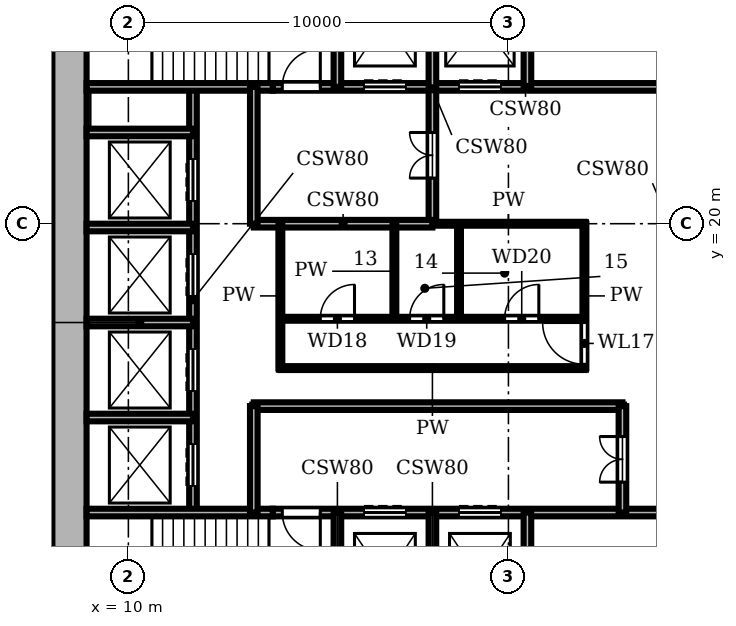
"""IFC4 building model, lengths in metres.
Left out: names, types, materials, properties, quantities, classifications, styles, units other than length and angle.
Written with IfcOpenShell. Run it as: python <this file> out.ifc"""

import sys

from ifc_helpers import new_model, si_unit, direction, frame, frame_2d, origin, place, context, subcontext, project, spatial, rectangle, extrude, element, fill, save


model = new_model("IFC4")
c1 = context("Model", 3, precision=1e-05, world=origin(), true_north=direction((0.0, 1.0)))
c2 = subcontext(c1, "Body", "Model", "MODEL_VIEW")
j1 = project(units=[si_unit("LENGTHUNIT", "METRE"), si_unit("PLANEANGLEUNIT", "RADIAN")], contexts=[c1])
p1 = place(None, origin())
s1 = spatial("IfcSite", under=j1, at=p1, CompositionType="ELEMENT")
p2 = place(p1, origin())
s2 = spatial("IfcBuilding", under=s1, at=p2, CompositionType="ELEMENT")
p3 = place(p2, frame((0.0, 0.0, 105.6)))
s3 = spatial("IfcBuildingStorey", under=s2, at=p3, CompositionType="ELEMENT", Elevation=105.6)
p4 = place(p3, frame((8.45, 27.1, 0.0), z_axis=(0.0, 0.0, 1.0), x_axis=(0.0, -1.0, 0.0)))
e1 = element("IfcWall", 1, at=p4, inside=s3, PredefinedType="SHEAR", context=c2, shape_type="SweptSolid", body=[
    extrude(rectangle(XDim=18.2, YDim=0.9, at=frame_2d((9.1, 0.0))), origin(), (0.0, 0.0, 1.0), 3.9),
])
p5 = place(p3, frame((8.9, 12.4, 0.0), z_axis=(0.0, 0.0, 1.0), x_axis=(1.0, 0.0, 0.0)))
e2 = element("IfcWall", 2, at=p5, inside=s3, PredefinedType="SHEAR", context=c2, shape_type="SweptSolid", body=[
    extrude(rectangle(XDim=4.9, YDim=0.2, at=frame_2d((2.45, 0.0))), origin(), (0.0, 0.0, 1.0), 3.58),
])
p6 = place(p3, frame((13.8, 12.4, 0.0), z_axis=(0.0, 0.0, 1.0), x_axis=(1.0, 0.0, 0.0)))
e3 = element("IfcWall", 3, at=p6, inside=s3, PredefinedType="SHEAR", context=c2, shape_type="SweptSolid", body=[
    extrude(rectangle(XDim=13.3, YDim=0.2, at=frame_2d((6.65, 0.0))), origin(), (0.0, 0.0, 1.0), 3.58),
])
p7 = place(p6, frame((2.4, 0.0, 0.0)))
e4 = element("IfcOpeningElement", 4, at=p7, cuts=e3, PredefinedType="OPENING", context=c2, shape_type="SweptSolid", body=[
    extrude(rectangle(XDim=1.1, YDim=2.1, at=frame_2d((0.55, 1.05))), frame((0.0, 0.11, 0.0), z_axis=(0.0, -1.0, 0.0), x_axis=(1.0, 0.0, 0.0)), (0.0, 0.0, 1.0), 0.22),
])
p8 = place(p6, frame((4.9, 0.0, 0.0)))
e5 = element("IfcOpeningElement", 5, at=p8, cuts=e3, PredefinedType="OPENING", context=c2, shape_type="SweptSolid", body=[
    extrude(rectangle(XDim=1.1, YDim=2.1, at=frame_2d((0.55, 1.05))), frame((0.0, 0.11, 0.0), z_axis=(0.0, -1.0, 0.0), x_axis=(1.0, 0.0, 0.0)), (0.0, 0.0, 1.0), 0.22),
])
p9 = place(p6, frame((0.25, 0.0, 0.0)))
e6 = element("IfcOpeningElement", 6, at=p9, cuts=e3, PredefinedType="OPENING", context=c2, shape_type="SweptSolid", body=[
    extrude(rectangle(XDim=1.0, YDim=2.1, at=frame_2d((0.5, 1.05))), frame((0.0, 0.11, 0.0), z_axis=(0.0, -1.0, 0.0), x_axis=(1.0, 0.0, 0.0)), (0.0, 0.0, 1.0), 0.22),
])
p10 = place(p3, frame((8.9, 14.9, 0.0), z_axis=(0.0, 0.0, 1.0), x_axis=(1.0, 0.0, 0.0)))
e7 = element("IfcWall", 7, at=p10, inside=s3, PredefinedType="SHEAR", context=c2, shape_type="SweptSolid", body=[
    extrude(rectangle(XDim=2.8, YDim=0.2, at=frame_2d((1.4, 0.0))), origin(), (0.0, 0.0, 1.0), 3.58),
])
p11 = place(p3, frame((13.3, 15.2, 0.0), z_axis=(0.0, 0.0, 1.0), x_axis=(1.0, 0.0, 0.0)))
e8 = element("IfcWall", 8, at=p11, inside=s3, PredefinedType="SHEAR", context=c2, shape_type="SweptSolid", body=[
    extrude(rectangle(XDim=9.7, YDim=0.2, at=frame_2d((4.85, 0.0))), origin(), (0.0, 0.0, 1.0), 3.58),
])
p12 = place(p3, frame((14.0, 16.2, 0.0), z_axis=(0.0, 0.0, 1.0), x_axis=(1.0, 0.0, 0.0)))
e9 = element("IfcWall", 9, at=p12, inside=s3, PredefinedType="PARTITIONING", context=c2, shape_type="SweptSolid", body=[
    extrude(rectangle(XDim=8.0, YDim=0.1, at=frame_2d((4.0, 0.0))), origin(), (0.0, 0.0, 1.0), 3.58),
])
p13 = place(p3, frame((8.9, 17.4, 0.0), z_axis=(0.0, 0.0, 1.0), x_axis=(1.0, 0.0, 0.0)))
e10 = element("IfcWall", 10, at=p13, inside=s3, PredefinedType="SHEAR", context=c2, shape_type="SweptSolid", body=[
    extrude(rectangle(XDim=2.8, YDim=0.2, at=frame_2d((1.4, 0.0))), origin(), (0.0, 0.0, 1.0), 3.58),
])
p14 = place(p3, frame((14.0, 17.5, 0.0), z_axis=(0.0, 0.0, 1.0), x_axis=(1.0, 0.0, 0.0)))
e11 = element("IfcWall", 11, at=p14, inside=s3, PredefinedType="PARTITIONING", context=c2, shape_type="SweptSolid", body=[
    extrude(rectangle(XDim=8.0, YDim=0.1, at=frame_2d((4.0, 0.0))), origin(), (0.0, 0.0, 1.0), 3.58),
])
p15 = place(p14, frame((1.05, 0.0, 0.0)))
e12 = element("IfcOpeningElement", 12, at=p15, cuts=e11, PredefinedType="OPENING", context=c2, shape_type="SweptSolid", body=[
    extrude(rectangle(XDim=0.9, YDim=2.1, at=frame_2d((0.45, 1.05))), frame((0.0, 0.06, 0.0), z_axis=(0.0, -1.0, 0.0), x_axis=(1.0, 0.0, 0.0)), (0.0, 0.0, 1.0), 0.12),
])
p16 = place(p14, frame((3.4, 0.0, 0.0)))
e13 = element("IfcOpeningElement", 13, at=p16, cuts=e11, PredefinedType="OPENING", context=c2, shape_type="SweptSolid", body=[
    extrude(rectangle(XDim=0.9, YDim=2.1, at=frame_2d((0.45, 1.05))), frame((0.0, 0.06, 0.0), z_axis=(0.0, -1.0, 0.0), x_axis=(1.0, 0.0, 0.0)), (0.0, 0.0, 1.0), 0.12),
])
p17 = place(p14, frame((5.9, 0.0, 0.0)))
e14 = element("IfcOpeningElement", 14, at=p17, cuts=e11, PredefinedType="OPENING", context=c2, shape_type="SweptSolid", body=[
    extrude(rectangle(XDim=0.9, YDim=2.1, at=frame_2d((0.45, 1.05))), frame((0.0, 0.06, 0.0), z_axis=(0.0, -1.0, 0.0), x_axis=(1.0, 0.0, 0.0)), (0.0, 0.0, 1.0), 0.12),
])
p18 = place(p3, frame((8.9, 19.9, 0.0), z_axis=(0.0, 0.0, 1.0), x_axis=(1.0, 0.0, 0.0)))
e15 = element("IfcWall", 15, at=p18, inside=s3, PredefinedType="SHEAR", context=c2, shape_type="SweptSolid", body=[
    extrude(rectangle(XDim=2.8, YDim=0.2, at=frame_2d((1.4, 0.0))), origin(), (0.0, 0.0, 1.0), 3.58),
])
p19 = place(p3, frame((18.0, 20.0, 0.0), z_axis=(0.0, 0.0, 1.0), x_axis=(1.0, 0.0, 0.0)))
e16 = element("IfcWall", 16, at=p19, inside=s3, PredefinedType="PARTITIONING", context=c2, shape_type="SweptSolid", body=[
    extrude(rectangle(XDim=4.0, YDim=0.1, at=frame_2d((2.0, 0.0))), origin(), (0.0, 0.0, 1.0), 3.58),
])
p20 = place(p3, frame((13.3, 20.0, 0.0), z_axis=(0.0, 0.0, 1.0), x_axis=(1.0, 0.0, 0.0)))
e17 = element("IfcWall", 17, at=p20, inside=s3, PredefinedType="SHEAR", context=c2, shape_type="SweptSolid", body=[
    extrude(rectangle(XDim=4.7, YDim=0.2, at=frame_2d((2.35, 0.0))), origin(), (0.0, 0.0, 1.0), 3.58),
])
p21 = place(p3, frame((8.9, 22.4, 0.0), z_axis=(0.0, 0.0, 1.0), x_axis=(1.0, 0.0, 0.0)))
e18 = element("IfcWall", 18, at=p21, inside=s3, PredefinedType="SHEAR", context=c2, shape_type="SweptSolid", body=[
    extrude(rectangle(XDim=2.8, YDim=0.2, at=frame_2d((1.4, 0.0))), origin(), (0.0, 0.0, 1.0), 3.58),
])
p22 = place(p3, frame((8.9, 23.6, 0.0), z_axis=(0.0, 0.0, 1.0), x_axis=(1.0, 0.0, 0.0)))
e19 = element("IfcWall", 19, at=p22, inside=s3, PredefinedType="SHEAR", context=c2, shape_type="SweptSolid", body=[
    extrude(rectangle(XDim=4.9, YDim=0.2, at=frame_2d((2.45, 0.0))), origin(), (0.0, 0.0, 1.0), 3.58),
])
p23 = place(p3, frame((13.8, 23.6, 0.0), z_axis=(0.0, 0.0, 1.0), x_axis=(1.0, 0.0, 0.0)))
e20 = element("IfcWall", 20, at=p23, inside=s3, PredefinedType="SHEAR", context=c2, shape_type="SweptSolid", body=[
    extrude(rectangle(XDim=13.3, YDim=0.2, at=frame_2d((6.65, 0.0))), origin(), (0.0, 0.0, 1.0), 3.58),
])
p24 = place(p23, frame((2.4, 0.0, 0.0)))
e21 = element("IfcOpeningElement", 21, at=p24, cuts=e20, PredefinedType="OPENING", context=c2, shape_type="SweptSolid", body=[
    extrude(rectangle(XDim=1.1, YDim=2.1, at=frame_2d((0.55, 1.05))), frame((0.0, 0.11, 0.0), z_axis=(0.0, -1.0, 0.0), x_axis=(1.0, 0.0, 0.0)), (0.0, 0.0, 1.0), 0.22),
])
p25 = place(p23, frame((4.9, 0.0, 0.0)))
e22 = element("IfcOpeningElement", 22, at=p25, cuts=e20, PredefinedType="OPENING", context=c2, shape_type="SweptSolid", body=[
    extrude(rectangle(XDim=1.1, YDim=2.1, at=frame_2d((0.55, 1.05))), frame((0.0, 0.11, 0.0), z_axis=(0.0, -1.0, 0.0), x_axis=(1.0, 0.0, 0.0)), (0.0, 0.0, 1.0), 0.22),
])
p26 = place(p23, frame((0.25, 0.0, 0.0)))
e23 = element("IfcOpeningElement", 23, at=p26, cuts=e20, PredefinedType="OPENING", context=c2, shape_type="SweptSolid", body=[
    extrude(rectangle(XDim=1.0, YDim=2.1, at=frame_2d((0.5, 1.05))), frame((0.0, 0.11, 0.0), z_axis=(0.0, -1.0, 0.0), x_axis=(1.0, 0.0, 0.0)), (0.0, 0.0, 1.0), 0.22),
])
p27 = place(p3, frame((11.7, 12.4, 0.0), z_axis=(0.0, 0.0, 1.0), x_axis=(0.0, 1.0, 0.0)))
e24 = element("IfcWall", 24, at=p27, inside=s3, PredefinedType="SHEAR", context=c2, shape_type="SweptSolid", body=[
    extrude(rectangle(XDim=11.2, YDim=0.2, at=frame_2d((5.6, 0.0))), origin(), (0.0, 0.0, 1.0), 3.58),
])
p28 = place(p27, frame((0.7, 0.0, 0.0)))
e25 = element("IfcOpeningElement", 25, at=p28, cuts=e24, PredefinedType="OPENING", context=c2, shape_type="SweptSolid", body=[
    extrude(rectangle(XDim=1.1, YDim=2.1, at=frame_2d((0.55, 1.05))), frame((0.0, 0.11, 0.0), z_axis=(0.0, -1.0, 0.0), x_axis=(1.0, 0.0, 0.0)), (0.0, 0.0, 1.0), 0.22),
])
p29 = place(p27, frame((3.2, 0.0, 0.0)))
e26 = element("IfcOpeningElement", 26, at=p29, cuts=e24, PredefinedType="OPENING", context=c2, shape_type="SweptSolid", body=[
    extrude(rectangle(XDim=1.1, YDim=2.1, at=frame_2d((0.55, 1.05))), frame((0.0, 0.11, 0.0), z_axis=(0.0, -1.0, 0.0), x_axis=(1.0, 0.0, 0.0)), (0.0, 0.0, 1.0), 0.22),
])
p30 = place(p27, frame((5.7, 0.0, 0.0)))
e27 = element("IfcOpeningElement", 27, at=p30, cuts=e24, PredefinedType="OPENING", context=c2, shape_type="SweptSolid", body=[
    extrude(rectangle(XDim=1.1, YDim=2.1, at=frame_2d((0.55, 1.05))), frame((0.0, 0.11, 0.0), z_axis=(0.0, -1.0, 0.0), x_axis=(1.0, 0.0, 0.0)), (0.0, 0.0, 1.0), 0.22),
])
p31 = place(p27, frame((8.2, 0.0, 0.0)))
e28 = element("IfcOpeningElement", 28, at=p31, cuts=e24, PredefinedType="OPENING", context=c2, shape_type="SweptSolid", body=[
    extrude(rectangle(XDim=1.1, YDim=2.1, at=frame_2d((0.55, 1.05))), frame((0.0, 0.11, 0.0), z_axis=(0.0, -1.0, 0.0), x_axis=(1.0, 0.0, 0.0)), (0.0, 0.0, 1.0), 0.22),
])
p32 = place(p3, frame((13.3, 12.4, 0.0), z_axis=(0.0, 0.0, 1.0), x_axis=(0.0, 1.0, 0.0)))
e29 = element("IfcWall", 29, at=p32, inside=s3, PredefinedType="SHEAR", context=c2, shape_type="SweptSolid", body=[
    extrude(rectangle(XDim=2.8, YDim=0.2, at=frame_2d((1.4, 0.0))), origin(), (0.0, 0.0, 1.0), 3.58),
])
p33 = place(p3, frame((13.3, 20.0, 0.0), z_axis=(0.0, 0.0, 1.0), x_axis=(0.0, 1.0, 0.0)))
e30 = element("IfcWall", 30, at=p33, inside=s3, PredefinedType="SHEAR", context=c2, shape_type="SweptSolid", body=[
    extrude(rectangle(XDim=3.6, YDim=0.2, at=frame_2d((1.8, 0.0))), origin(), (0.0, 0.0, 1.0), 3.58),
])
p34 = place(p3, frame((14.0, 16.2, 0.0), z_axis=(0.0, 0.0, 1.0), x_axis=(0.0, 1.0, 0.0)))
e31 = element("IfcWall", 31, at=p34, inside=s3, PredefinedType="PARTITIONING", context=c2, shape_type="SweptSolid", body=[
    extrude(rectangle(XDim=3.8, YDim=0.1, at=frame_2d((1.9, 0.0))), origin(), (0.0, 0.0, 1.0), 3.58),
])
for number, where, z_axis, x_axis in (
    (32, (15.5, 8.9, 0.0), (0.0, 0.0, 1.0), (0.0, 1.0, 0.0)),
    (33, (15.5, 23.6, 0.0), (0.0, 0.0, 1.0), (0.0, 1.0, 0.0)),
):
    element("IfcWall", number, at=place(p3, frame(where, z_axis=z_axis, x_axis=x_axis)), inside=s3, PredefinedType="SHEAR", context=c2, shape_type="SweptSolid", body=[
        extrude(rectangle(XDim=3.5, YDim=0.2, at=frame_2d((1.75, 0.0))), origin(), (0.0, 0.0, 1.0), 3.58),
    ])
p35 = place(p3, frame((17.0, 17.5, 0.0), z_axis=(0.0, 0.0, 1.0), x_axis=(0.0, 1.0, 0.0)))
e34 = element("IfcWall", 34, at=p35, inside=s3, PredefinedType="PARTITIONING", context=c2, shape_type="SweptSolid", body=[
    extrude(rectangle(XDim=2.5, YDim=0.1, at=frame_2d((1.25, 0.0))), origin(), (0.0, 0.0, 1.0), 3.58),
])
p36 = place(p3, frame((18.0, 8.9, 0.0), z_axis=(0.0, 0.0, 1.0), x_axis=(0.0, 1.0, 0.0)))
e35 = element("IfcWall", 35, at=p36, inside=s3, PredefinedType="SHEAR", context=c2, shape_type="SweptSolid", body=[
    extrude(rectangle(XDim=3.5, YDim=0.2, at=frame_2d((1.75, 0.0))), origin(), (0.0, 0.0, 1.0), 3.58),
])
p37 = place(p3, frame((18.0, 20.0, 0.0), z_axis=(0.0, 0.0, 1.0), x_axis=(0.0, 1.0, 0.0)))
e36 = element("IfcWall", 36, at=p37, inside=s3, PredefinedType="SHEAR", context=c2, shape_type="SweptSolid", body=[
    extrude(rectangle(XDim=7.1, YDim=0.2, at=frame_2d((3.55, 0.0))), origin(), (0.0, 0.0, 1.0), 3.58),
])
p38 = place(p37, frame((1.2, 0.0, 0.0)))
e37 = element("IfcOpeningElement", 37, at=p38, cuts=e36, PredefinedType="OPENING", context=c2, shape_type="SweptSolid", body=[
    extrude(rectangle(XDim=1.2, YDim=2.1, at=frame_2d((0.6, 1.05))), frame((0.0, 0.11, 0.0), z_axis=(0.0, -1.0, 0.0), x_axis=(1.0, 0.0, 0.0)), (0.0, 0.0, 1.0), 0.22),
])
p39 = place(p3, frame((18.7, 17.5, 0.0), z_axis=(0.0, 0.0, 1.0), x_axis=(0.0, 1.0, 0.0)))
e38 = element("IfcWall", 38, at=p39, inside=s3, PredefinedType="PARTITIONING", context=c2, shape_type="SweptSolid", body=[
    extrude(rectangle(XDim=2.5, YDim=0.1, at=frame_2d((1.25, 0.0))), origin(), (0.0, 0.0, 1.0), 3.58),
])
for number, where, z_axis, x_axis in (
    (39, (20.5, 8.9, 0.0), (0.0, 0.0, 1.0), (0.0, 1.0, 0.0)),
    (40, (20.5, 23.6, 0.0), (0.0, 0.0, 1.0), (0.0, 1.0, 0.0)),
):
    element("IfcWall", number, at=place(p3, frame(where, z_axis=z_axis, x_axis=x_axis)), inside=s3, PredefinedType="SHEAR", context=c2, shape_type="SweptSolid", body=[
        extrude(rectangle(XDim=3.5, YDim=0.2, at=frame_2d((1.75, 0.0))), origin(), (0.0, 0.0, 1.0), 3.58),
    ])
p40 = place(p3, frame((22.0, 16.2, 0.0), z_axis=(0.0, 0.0, 1.0), x_axis=(0.0, 1.0, 0.0)))
e41 = element("IfcWall", 41, at=p40, inside=s3, PredefinedType="PARTITIONING", context=c2, shape_type="SweptSolid", body=[
    extrude(rectangle(XDim=3.8, YDim=0.1, at=frame_2d((1.9, 0.0))), origin(), (0.0, 0.0, 1.0), 3.58),
])
p41 = place(p40, frame((0.1, 0.0, 0.0)))
e42 = element("IfcOpeningElement", 42, at=p41, cuts=e41, PredefinedType="OPENING", context=c2, shape_type="SweptSolid", body=[
    extrude(rectangle(XDim=1.1, YDim=2.1, at=frame_2d((0.55, 1.05))), frame((0.0, 0.06, 0.0), z_axis=(0.0, -1.0, 0.0), x_axis=(1.0, 0.0, 0.0)), (0.0, 0.0, 1.0), 0.12),
])
p42 = place(p3, frame((23.0, 12.4, 0.0), z_axis=(0.0, 0.0, 1.0), x_axis=(0.0, 1.0, 0.0)))
e43 = element("IfcWall", 43, at=p42, inside=s3, PredefinedType="SHEAR", context=c2, shape_type="SweptSolid", body=[
    extrude(rectangle(XDim=2.8, YDim=0.2, at=frame_2d((1.4, 0.0))), origin(), (0.0, 0.0, 1.0), 3.58),
])
p43 = place(p42, frame((0.8, 0.0, 0.0)))
e44 = element("IfcOpeningElement", 44, at=p43, cuts=e43, PredefinedType="OPENING", context=c2, shape_type="SweptSolid", body=[
    extrude(rectangle(XDim=1.2, YDim=2.1, at=frame_2d((0.6, 1.05))), frame((0.0, 0.11, 0.0), z_axis=(0.0, -1.0, 0.0), x_axis=(1.0, 0.0, 0.0)), (0.0, 0.0, 1.0), 0.22),
])
p44 = place(p28, origin())
e45 = element("IfcDoor", 45, at=p44, inside=s3, OperationType="DOUBLE_DOOR_SLIDING", PredefinedType="DOOR", context=c2, shape_type="SweptSolid", body=[
    extrude(rectangle(XDim=1.1, YDim=2.1, at=frame_2d((0.55, 1.05))), frame((0.0, 0.025, 0.0), z_axis=(0.0, -1.0, 0.0), x_axis=(1.0, 0.0, 0.0)), (0.0, 0.0, 1.0), 0.05),
])
fill(e25, e45)
p45 = place(p29, origin())
e46 = element("IfcDoor", 46, at=p45, inside=s3, OperationType="DOUBLE_DOOR_SLIDING", PredefinedType="DOOR", context=c2, shape_type="SweptSolid", body=[
    extrude(rectangle(XDim=1.1, YDim=2.1, at=frame_2d((0.55, 1.05))), frame((0.0, 0.025, 0.0), z_axis=(0.0, -1.0, 0.0), x_axis=(1.0, 0.0, 0.0)), (0.0, 0.0, 1.0), 0.05),
])
fill(e26, e46)
p46 = place(p30, origin())
e47 = element("IfcDoor", 47, at=p46, inside=s3, OperationType="DOUBLE_DOOR_SLIDING", PredefinedType="DOOR", context=c2, shape_type="SweptSolid", body=[
    extrude(rectangle(XDim=1.1, YDim=2.1, at=frame_2d((0.55, 1.05))), frame((0.0, 0.025, 0.0), z_axis=(0.0, -1.0, 0.0), x_axis=(1.0, 0.0, 0.0)), (0.0, 0.0, 1.0), 0.05),
])
fill(e27, e47)
p47 = place(p31, origin())
e48 = element("IfcDoor", 48, at=p47, inside=s3, OperationType="DOUBLE_DOOR_SLIDING", PredefinedType="DOOR", context=c2, shape_type="SweptSolid", body=[
    extrude(rectangle(XDim=1.1, YDim=2.1, at=frame_2d((0.55, 1.05))), frame((0.0, 0.025, 0.0), z_axis=(0.0, -1.0, 0.0), x_axis=(1.0, 0.0, 0.0)), (0.0, 0.0, 1.0), 0.05),
])
fill(e28, e48)
p48 = place(p7, origin())
e49 = element("IfcDoor", 49, at=p48, inside=s3, OperationType="DOUBLE_DOOR_SLIDING", PredefinedType="DOOR", context=c2, shape_type="SweptSolid", body=[
    extrude(rectangle(XDim=1.1, YDim=2.1, at=frame_2d((0.55, 1.05))), frame((0.0, 0.025, 0.0), z_axis=(0.0, -1.0, 0.0), x_axis=(1.0, 0.0, 0.0)), (0.0, 0.0, 1.0), 0.05),
])
fill(e4, e49)
p49 = place(p8, origin())
e50 = element("IfcDoor", 50, at=p49, inside=s3, OperationType="DOUBLE_DOOR_SLIDING", PredefinedType="DOOR", context=c2, shape_type="SweptSolid", body=[
    extrude(rectangle(XDim=1.1, YDim=2.1, at=frame_2d((0.55, 1.05))), frame((0.0, 0.025, 0.0), z_axis=(0.0, -1.0, 0.0), x_axis=(1.0, 0.0, 0.0)), (0.0, 0.0, 1.0), 0.05),
])
fill(e5, e50)
p50 = place(p24, origin())
e51 = element("IfcDoor", 51, at=p50, inside=s3, OperationType="DOUBLE_DOOR_SLIDING", PredefinedType="DOOR", context=c2, shape_type="SweptSolid", body=[
    extrude(rectangle(XDim=1.1, YDim=2.1, at=frame_2d((0.55, 1.05))), frame((0.0, 0.025, 0.0), z_axis=(0.0, -1.0, 0.0), x_axis=(1.0, 0.0, 0.0)), (0.0, 0.0, 1.0), 0.05),
])
fill(e21, e51)
p51 = place(p25, origin())
e52 = element("IfcDoor", 52, at=p51, inside=s3, OperationType="DOUBLE_DOOR_SLIDING", PredefinedType="DOOR", context=c2, shape_type="SweptSolid", body=[
    extrude(rectangle(XDim=1.1, YDim=2.1, at=frame_2d((0.55, 1.05))), frame((0.0, 0.025, 0.0), z_axis=(0.0, -1.0, 0.0), x_axis=(1.0, 0.0, 0.0)), (0.0, 0.0, 1.0), 0.05),
])
fill(e22, e52)
p52 = place(p9, frame((1.0, 0.0, 0.0), z_axis=(0.0, 0.0, 1.0), x_axis=(-1.0, 0.0, 0.0)))
e53 = element("IfcDoor", 53, at=p52, inside=s3, OperationType="SINGLE_SWING_LEFT", PredefinedType="DOOR", context=c2, shape_type="SweptSolid", body=[
    extrude(rectangle(XDim=1.0, YDim=2.1, at=frame_2d((0.5, 1.05))), frame((0.0, 0.025, 0.0), z_axis=(0.0, -1.0, 0.0), x_axis=(1.0, 0.0, 0.0)), (0.0, 0.0, 1.0), 0.05),
])
fill(e6, e53)
p53 = place(p26, origin())
e54 = element("IfcDoor", 54, at=p53, inside=s3, OperationType="SINGLE_SWING_RIGHT", PredefinedType="DOOR", context=c2, shape_type="SweptSolid", body=[
    extrude(rectangle(XDim=1.0, YDim=2.1, at=frame_2d((0.5, 1.05))), frame((0.0, 0.025, 0.0), z_axis=(0.0, -1.0, 0.0), x_axis=(1.0, 0.0, 0.0)), (0.0, 0.0, 1.0), 0.05),
])
fill(e23, e54)
p54 = place(p43, origin())
e55 = element("IfcDoor", 55, at=p54, inside=s3, OperationType="DOUBLE_DOOR_SINGLE_SWING", PredefinedType="DOOR", context=c2, shape_type="SweptSolid", body=[
    extrude(rectangle(XDim=1.2, YDim=2.1, at=frame_2d((0.6, 1.05))), frame((0.0, 0.025, 0.0), z_axis=(0.0, -1.0, 0.0), x_axis=(1.0, 0.0, 0.0)), (0.0, 0.0, 1.0), 0.05),
])
fill(e44, e55)
p55 = place(p38, origin())
e56 = element("IfcDoor", 56, at=p55, inside=s3, OperationType="DOUBLE_DOOR_SINGLE_SWING", PredefinedType="DOOR", context=c2, shape_type="SweptSolid", body=[
    extrude(rectangle(XDim=1.2, YDim=2.1, at=frame_2d((0.6, 1.05))), frame((0.0, 0.025, 0.0), z_axis=(0.0, -1.0, 0.0), x_axis=(1.0, 0.0, 0.0)), (0.0, 0.0, 1.0), 0.05),
])
fill(e37, e56)
p56 = place(p41, origin())
e57 = element("IfcDoor", 57, at=p56, inside=s3, OperationType="SINGLE_SWING_RIGHT", PredefinedType="DOOR", context=c2, shape_type="SweptSolid", body=[
    extrude(rectangle(XDim=1.1, YDim=2.1, at=frame_2d((0.55, 1.05))), frame((0.0, 0.025, 0.0), z_axis=(0.0, -1.0, 0.0), x_axis=(1.0, 0.0, 0.0)), (0.0, 0.0, 1.0), 0.05),
])
fill(e42, e57)
p57 = place(p15, origin())
e58 = element("IfcDoor", 58, at=p57, inside=s3, OperationType="SINGLE_SWING_RIGHT", PredefinedType="DOOR", context=c2, shape_type="SweptSolid", body=[
    extrude(rectangle(XDim=0.9, YDim=2.1, at=frame_2d((0.45, 1.05))), frame((0.0, 0.025, 0.0), z_axis=(0.0, -1.0, 0.0), x_axis=(1.0, 0.0, 0.0)), (0.0, 0.0, 1.0), 0.05),
])
fill(e12, e58)
p58 = place(p16, origin())
e59 = element("IfcDoor", 59, at=p58, inside=s3, OperationType="SINGLE_SWING_RIGHT", PredefinedType="DOOR", context=c2, shape_type="SweptSolid", body=[
    extrude(rectangle(XDim=0.9, YDim=2.1, at=frame_2d((0.45, 1.05))), frame((0.0, 0.025, 0.0), z_axis=(0.0, -1.0, 0.0), x_axis=(1.0, 0.0, 0.0)), (0.0, 0.0, 1.0), 0.05),
])
fill(e13, e59)
p59 = place(p17, origin())
e60 = element("IfcDoor", 60, at=p59, inside=s3, OperationType="SINGLE_SWING_RIGHT", PredefinedType="DOOR", context=c2, shape_type="SweptSolid", body=[
    extrude(rectangle(XDim=0.9, YDim=2.1, at=frame_2d((0.45, 1.05))), frame((0.0, 0.025, 0.0), z_axis=(0.0, -1.0, 0.0), x_axis=(1.0, 0.0, 0.0)), (0.0, 0.0, 1.0), 0.05),
])
fill(e14, e60)
save(model, sys.argv[1])
